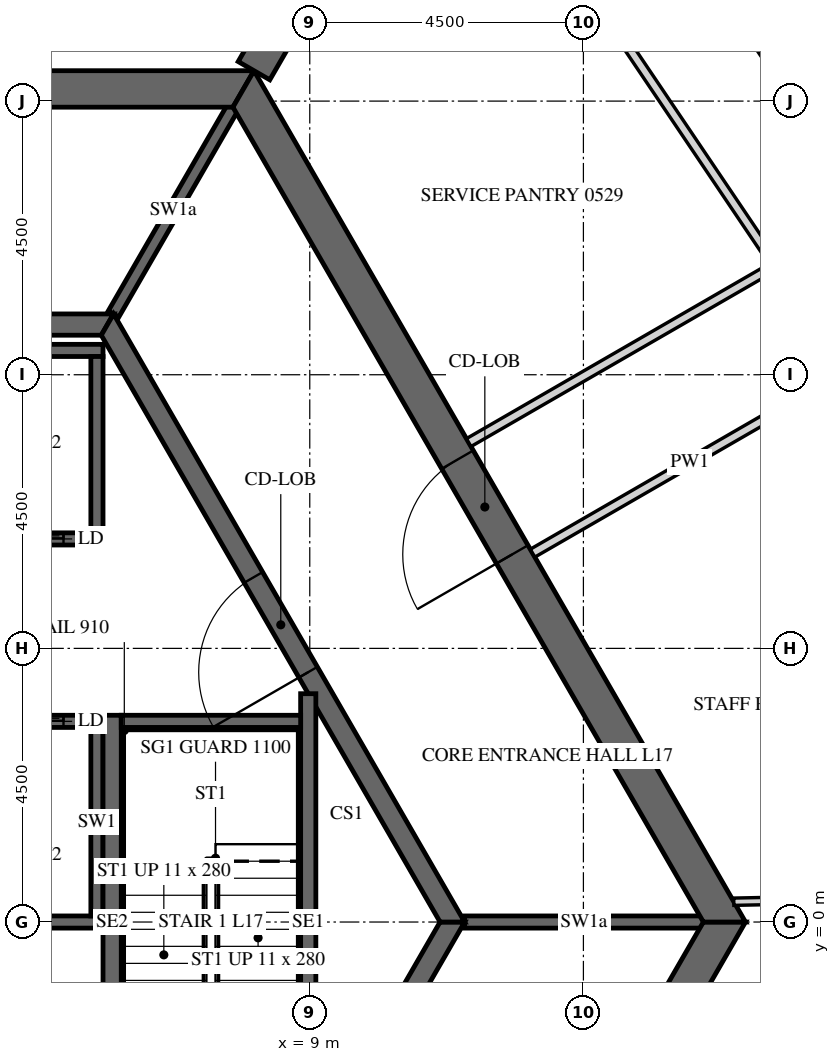
"""IFC4 building model, lengths in metres.
Left out: names, types, materials, properties, quantities, classifications, styles, units other than length and angle.
Written with IfcOpenShell. Run it as: python <this file> out.ifc"""

import sys

from ifc_helpers import new_model, si_unit, direction, frame, frame_2d, origin, place, context, subcontext, project, spatial, polyline, rectangle, outline, extrude, element, fill, save


model = new_model("IFC4")
c1 = context("Model", 3, precision=1e-05, world=origin(), true_north=direction((0.0, 1.0)))
c2 = subcontext(c1, "Body", "Model", "MODEL_VIEW")
j1 = project(units=[si_unit("LENGTHUNIT", "METRE"), si_unit("PLANEANGLEUNIT", "RADIAN")], contexts=[c1])
p1 = place(None, origin())
s1 = spatial("IfcSite", under=j1, at=p1, CompositionType="ELEMENT")
p2 = place(p1, origin())
s2 = spatial("IfcBuilding", under=s1, at=p2, CompositionType="ELEMENT")
p3 = place(p2, frame((0.0, 0.0, 80.4)))
s3 = spatial("IfcBuildingStorey", under=s2, at=p3, CompositionType="ELEMENT", Elevation=80.4)
p4 = place(p3, frame((7.91, -13.7, -0.15), z_axis=(0.0, 0.0, 1.0), x_axis=(0.499999880136, 0.866025472988, 0.0)))
e1 = element("IfcWall", 1, at=p4, inside=s3, PredefinedType="SHEAR", context=c2, shape_type="SweptSolid", body=[
    extrude(outline(polyline([(-0.173, -0.3), (15.993, -0.3), (15.646, 0.3), (0.173, 0.3), (-0.173, -0.3)])), origin(), (0.0, 0.0, 1.0), 3.9),
])
p5 = place(p4, frame((7.039, 0.0, 0.15)))
e2 = element("IfcOpeningElement", 2, at=p5, cuts=e1, PredefinedType="OPENING", context=c2, shape_type="SweptSolid", body=[
    extrude(rectangle(XDim=1.8, YDim=2.4, at=frame_2d((0.9, 1.2))), frame((0.0, 0.31, 0.0), z_axis=(0.0, -1.0, 0.0), x_axis=(1.0, 0.0, 0.0)), (0.0, 0.0, 1.0), 0.62),
])
p6 = place(p3, frame((15.819, 0.0, -0.15), z_axis=(0.0, 0.0, 1.0), x_axis=(-0.499999880136, 0.866025472988, 0.0)))
e3 = element("IfcWall", 3, at=p6, inside=s3, PredefinedType="SHEAR", context=c2, shape_type="SweptSolid", body=[
    extrude(outline(polyline([(-0.173, -0.3), (15.993, -0.3), (15.646, 0.3), (0.173, 0.3), (-0.173, -0.3)])), origin(), (0.0, 0.0, 1.0), 3.9),
])
p7 = place(p6, frame((6.981, 0.0, 0.15)))
e4 = element("IfcOpeningElement", 4, at=p7, cuts=e3, PredefinedType="OPENING", context=c2, shape_type="SweptSolid", body=[
    extrude(rectangle(XDim=1.8, YDim=2.4, at=frame_2d((0.9, 1.2))), frame((0.0, 0.31, 0.0), z_axis=(0.0, -1.0, 0.0), x_axis=(1.0, 0.0, 0.0)), (0.0, 0.0, 1.0), 0.62),
])
p8 = place(p3, frame((7.91, 13.7, -0.15), z_axis=(0.0, 0.0, 1.0), x_axis=(-1.0, 0.0, 0.0)))
e5 = element("IfcWall", 5, at=p8, inside=s3, PredefinedType="SHEAR", context=c2, shape_type="SweptSolid", body=[
    extrude(outline(polyline([(-0.173, -0.3), (15.993, -0.3), (15.646, 0.3), (0.173, 0.3), (-0.173, -0.3)])), origin(), (0.0, 0.0, 1.0), 3.9),
])
p9 = place(p8, frame((7.31, 0.0, 0.15)))
e6 = element("IfcOpeningElement", 6, at=p9, cuts=e5, PredefinedType="OPENING", context=c2, shape_type="SweptSolid", body=[
    extrude(rectangle(XDim=1.2, YDim=2.4, at=frame_2d((0.6, 1.2))), frame((0.0, 0.31, 0.0), z_axis=(0.0, -1.0, 0.0), x_axis=(1.0, 0.0, 0.0)), (0.0, 0.0, 1.0), 0.62),
])
p10 = place(p3, frame((8.083, 14.0, -0.15), z_axis=(0.0, 0.0, 1.0), x_axis=(0.499997680643, 0.866026742862, 0.0)))
e7 = element("IfcWall", 7, at=p10, inside=s3, PredefinedType="SHEAR", context=c2, shape_type="SweptSolid", body=[
    extrude(rectangle(XDim=16.509, YDim=0.6, at=frame_2d((8.254, 0.0))), origin(), (0.0, 0.0, 1.0), 3.9),
])
p11 = place(p10, frame((7.354, 0.0, 0.15)))
e8 = element("IfcOpeningElement", 8, at=p11, cuts=e7, PredefinedType="OPENING", context=c2, shape_type="SweptSolid", body=[
    extrude(rectangle(XDim=1.8, YDim=2.4, at=frame_2d((0.9, 1.2))), frame((0.0, 0.31, 0.0), z_axis=(0.0, -1.0, 0.0), x_axis=(1.0, 0.0, 0.0)), (0.0, 0.0, 1.0), 0.62),
])
p12 = place(p3, frame((5.673, -9.825, -0.15), z_axis=(0.0, 0.0, 1.0), x_axis=(0.499995046907, 0.866028263435, 0.0)))
e9 = element("IfcWall", 9, at=p12, inside=s3, PredefinedType="SHEAR", context=c2, shape_type="SweptSolid", body=[
    extrude(outline(polyline([(-0.101, -0.175), (11.446, -0.175), (11.244, 0.175), (0.101, 0.175), (-0.101, -0.175)])), origin(), (0.0, 0.0, 1.0), 3.9),
])
p13 = place(p12, frame((4.801, 0.0, 0.15)))
e10 = element("IfcOpeningElement", 10, at=p13, cuts=e9, PredefinedType="OPENING", context=c2, shape_type="SweptSolid", body=[
    extrude(rectangle(XDim=1.8, YDim=2.4, at=frame_2d((0.9, 1.2))), frame((0.0, 0.185, 0.0), z_axis=(0.0, -1.0, 0.0), x_axis=(1.0, 0.0, 0.0)), (0.0, 0.0, 1.0), 0.37),
])
p14 = place(p3, frame((11.345, 0.0, -0.15), z_axis=(0.0, 0.0, 1.0), x_axis=(-0.499995046907, 0.866028263435, 0.0)))
e11 = element("IfcWall", 11, at=p14, inside=s3, PredefinedType="SHEAR", context=c2, shape_type="SweptSolid", body=[
    extrude(outline(polyline([(-0.101, -0.175), (11.446, -0.175), (11.244, 0.175), (0.101, 0.175), (-0.101, -0.175)])), origin(), (0.0, 0.0, 1.0), 3.9),
])
p15 = place(p14, frame((4.744, 0.0, 0.15)))
e12 = element("IfcOpeningElement", 12, at=p15, cuts=e11, PredefinedType="OPENING", context=c2, shape_type="SweptSolid", body=[
    extrude(rectangle(XDim=1.8, YDim=2.4, at=frame_2d((0.9, 1.2))), frame((0.0, 0.185, 0.0), z_axis=(0.0, -1.0, 0.0), x_axis=(1.0, 0.0, 0.0)), (0.0, 0.0, 1.0), 0.37),
])
p16 = place(p3, frame((5.673, 9.825, -0.15), z_axis=(0.0, 0.0, 1.0), x_axis=(-1.0, 0.0, 0.0)))
e13 = element("IfcWall", 13, at=p16, inside=s3, PredefinedType="SHEAR", context=c2, shape_type="SweptSolid", body=[
    extrude(outline(polyline([(-0.101, -0.175), (11.446, -0.175), (11.244, 0.175), (0.101, 0.175), (-0.101, -0.175)])), origin(), (0.0, 0.0, 1.0), 3.9),
])
p17 = place(p3, frame((-5.6, 6.3, -0.25), z_axis=(0.0, 0.0, 1.0), x_axis=(1.0, 0.0, 0.0)))
e14 = element("IfcWall", 14, at=p17, inside=s3, PredefinedType="SHEAR", context=c2, shape_type="SweptSolid", body=[
    extrude(rectangle(XDim=11.2, YDim=0.2, at=frame_2d((5.6, 0.0))), origin(), (0.0, 0.0, 1.0), 3.9),
])
p18 = place(p17, frame((0.65, 0.0, 0.25)))
e15 = element("IfcOpeningElement", 15, at=p18, cuts=e14, PredefinedType="OPENING", context=c2, shape_type="SweptSolid", body=[
    extrude(rectangle(XDim=1.1, YDim=2.1, at=frame_2d((0.55, 1.05))), frame((0.0, 0.11, 0.0), z_axis=(0.0, -1.0, 0.0), x_axis=(1.0, 0.0, 0.0)), (0.0, 0.0, 1.0), 0.22),
])
p19 = place(p17, frame((2.85, 0.0, 0.25)))
e16 = element("IfcOpeningElement", 16, at=p19, cuts=e14, PredefinedType="OPENING", context=c2, shape_type="SweptSolid", body=[
    extrude(rectangle(XDim=1.1, YDim=2.1, at=frame_2d((0.55, 1.05))), frame((0.0, 0.11, 0.0), z_axis=(0.0, -1.0, 0.0), x_axis=(1.0, 0.0, 0.0)), (0.0, 0.0, 1.0), 0.22),
])
p20 = place(p17, frame((5.05, 0.0, 0.25)))
e17 = element("IfcOpeningElement", 17, at=p20, cuts=e14, PredefinedType="OPENING", context=c2, shape_type="SweptSolid", body=[
    extrude(rectangle(XDim=1.1, YDim=2.1, at=frame_2d((0.55, 1.05))), frame((0.0, 0.11, 0.0), z_axis=(0.0, -1.0, 0.0), x_axis=(1.0, 0.0, 0.0)), (0.0, 0.0, 1.0), 0.22),
])
p21 = place(p17, frame((7.25, 0.0, 0.25)))
e18 = element("IfcOpeningElement", 18, at=p21, cuts=e14, PredefinedType="OPENING", context=c2, shape_type="SweptSolid", body=[
    extrude(rectangle(XDim=1.1, YDim=2.1, at=frame_2d((0.55, 1.05))), frame((0.0, 0.11, 0.0), z_axis=(0.0, -1.0, 0.0), x_axis=(1.0, 0.0, 0.0)), (0.0, 0.0, 1.0), 0.22),
])
p22 = place(p17, frame((9.45, 0.0, 0.25)))
e19 = element("IfcOpeningElement", 19, at=p22, cuts=e14, PredefinedType="OPENING", context=c2, shape_type="SweptSolid", body=[
    extrude(rectangle(XDim=1.1, YDim=2.1, at=frame_2d((0.55, 1.05))), frame((0.0, 0.11, 0.0), z_axis=(0.0, -1.0, 0.0), x_axis=(1.0, 0.0, 0.0)), (0.0, 0.0, 1.0), 0.22),
])
p23 = place(p3, frame((-5.6, 9.4, -0.25), z_axis=(0.0, 0.0, 1.0), x_axis=(1.0, 0.0, 0.0)))
e20 = element("IfcWall", 20, at=p23, inside=s3, PredefinedType="SHEAR", context=c2, shape_type="SweptSolid", body=[
    extrude(rectangle(XDim=11.2, YDim=0.2, at=frame_2d((5.6, 0.0))), origin(), (0.0, 0.0, 1.0), 3.9),
])
p24 = place(p3, frame((5.5, 6.4, -0.25), z_axis=(0.0, 0.0, 1.0), x_axis=(0.0, 1.0, 0.0)))
e21 = element("IfcWall", 21, at=p24, inside=s3, PredefinedType="SHEAR", context=c2, shape_type="SweptSolid", body=[
    extrude(rectangle(XDim=2.9, YDim=0.2, at=frame_2d((1.45, 0.0))), origin(), (0.0, 0.0, 1.0), 3.9),
])
p25 = place(p3, frame((-5.6, 3.3, -0.25), z_axis=(0.0, 0.0, 1.0), x_axis=(1.0, 0.0, 0.0)))
e22 = element("IfcWall", 22, at=p25, inside=s3, PredefinedType="SHEAR", context=c2, shape_type="SweptSolid", body=[
    extrude(rectangle(XDim=11.2, YDim=0.2, at=frame_2d((5.6, 0.0))), origin(), (0.0, 0.0, 1.0), 3.9),
])
p26 = place(p25, frame((0.65, 0.0, 0.25)))
e23 = element("IfcOpeningElement", 23, at=p26, cuts=e22, PredefinedType="OPENING", context=c2, shape_type="SweptSolid", body=[
    extrude(rectangle(XDim=1.1, YDim=2.1, at=frame_2d((0.55, 1.05))), frame((0.0, 0.11, 0.0), z_axis=(0.0, -1.0, 0.0), x_axis=(1.0, 0.0, 0.0)), (0.0, 0.0, 1.0), 0.22),
])
p27 = place(p25, frame((2.85, 0.0, 0.25)))
e24 = element("IfcOpeningElement", 24, at=p27, cuts=e22, PredefinedType="OPENING", context=c2, shape_type="SweptSolid", body=[
    extrude(rectangle(XDim=1.1, YDim=2.1, at=frame_2d((0.55, 1.05))), frame((0.0, 0.11, 0.0), z_axis=(0.0, -1.0, 0.0), x_axis=(1.0, 0.0, 0.0)), (0.0, 0.0, 1.0), 0.22),
])
p28 = place(p25, frame((5.05, 0.0, 0.25)))
e25 = element("IfcOpeningElement", 25, at=p28, cuts=e22, PredefinedType="OPENING", context=c2, shape_type="SweptSolid", body=[
    extrude(rectangle(XDim=1.1, YDim=2.1, at=frame_2d((0.55, 1.05))), frame((0.0, 0.11, 0.0), z_axis=(0.0, -1.0, 0.0), x_axis=(1.0, 0.0, 0.0)), (0.0, 0.0, 1.0), 0.22),
])
p29 = place(p25, frame((7.25, 0.0, 0.25)))
e26 = element("IfcOpeningElement", 26, at=p29, cuts=e22, PredefinedType="OPENING", context=c2, shape_type="SweptSolid", body=[
    extrude(rectangle(XDim=1.1, YDim=2.1, at=frame_2d((0.55, 1.05))), frame((0.0, 0.11, 0.0), z_axis=(0.0, -1.0, 0.0), x_axis=(1.0, 0.0, 0.0)), (0.0, 0.0, 1.0), 0.22),
])
p30 = place(p25, frame((9.45, 0.0, 0.25)))
e27 = element("IfcOpeningElement", 27, at=p30, cuts=e22, PredefinedType="OPENING", context=c2, shape_type="SweptSolid", body=[
    extrude(rectangle(XDim=1.1, YDim=2.1, at=frame_2d((0.55, 1.05))), frame((0.0, 0.11, 0.0), z_axis=(0.0, -1.0, 0.0), x_axis=(1.0, 0.0, 0.0)), (0.0, 0.0, 1.0), 0.22),
])
p31 = place(p3, frame((-5.6, 0.0, -0.25), z_axis=(0.0, 0.0, 1.0), x_axis=(1.0, 0.0, 0.0)))
e28 = element("IfcWall", 28, at=p31, inside=s3, PredefinedType="SHEAR", context=c2, shape_type="SweptSolid", body=[
    extrude(rectangle(XDim=11.2, YDim=0.2, at=frame_2d((5.6, 0.0))), origin(), (0.0, 0.0, 1.0), 3.9),
])
p32 = place(p3, frame((5.5, 0.1, -0.25), z_axis=(0.0, 0.0, 1.0), x_axis=(0.0, 1.0, 0.0)))
e29 = element("IfcWall", 29, at=p32, inside=s3, PredefinedType="SHEAR", context=c2, shape_type="SweptSolid", body=[
    extrude(rectangle(XDim=3.1, YDim=0.2, at=frame_2d((1.55, 0.0))), origin(), (0.0, 0.0, 1.0), 3.9),
])
p33 = place(p3, frame((11.547, 0.0, -0.15), z_axis=(0.0, 0.0, 1.0), x_axis=(1.0, 0.0, 0.0)))
e30 = element("IfcWall", 30, at=p33, inside=s3, PredefinedType="SHEAR", context=c2, shape_type="SweptSolid", body=[
    extrude(rectangle(XDim=3.926, YDim=0.2, at=frame_2d((1.963, 0.0))), origin(), (0.0, 0.0, 1.0), 3.9),
])
p34 = place(p3, frame((5.773, 10.0, -0.15), z_axis=(0.0, 0.0, 1.0), x_axis=(0.500038251005, 0.86600331843, 0.0)))
e31 = element("IfcWall", 31, at=p34, inside=s3, PredefinedType="SHEAR", context=c2, shape_type="SweptSolid", body=[
    extrude(rectangle(XDim=3.926, YDim=0.2, at=frame_2d((1.963, 0.0))), origin(), (0.0, 0.0, 1.0), 3.9),
])
p35 = place(p3, frame((5.75, -3.4, -0.25), z_axis=(0.0, 0.0, 1.0), x_axis=(0.0, 1.0, 0.0)))
e32 = element("IfcWall", 32, at=p35, inside=s3, PredefinedType="SHEAR", context=c2, shape_type="SweptSolid", body=[
    extrude(rectangle(XDim=6.8, YDim=0.3, at=frame_2d((3.4, 0.0))), origin(), (0.0, 0.0, 1.0), 3.9),
])
p36 = place(p3, frame((8.975, -3.755, -0.25), z_axis=(0.0, 0.0, 1.0), x_axis=(0.0, 1.0, 0.0)))
e33 = element("IfcWall", 33, at=p36, inside=s3, PredefinedType="SHEAR", context=c2, shape_type="SweptSolid", body=[
    extrude(rectangle(XDim=7.51, YDim=0.25, at=frame_2d((3.755, 0.0))), origin(), (0.0, 0.0, 1.0), 3.9),
])
p37 = place(p3, frame((5.9, 3.3, -0.25), z_axis=(0.0, 0.0, 1.0), x_axis=(1.0, 0.0, 0.0)))
e34 = element("IfcWall", 34, at=p37, inside=s3, PredefinedType="SHEAR", context=c2, shape_type="SweptSolid", body=[
    extrude(rectangle(XDim=2.95, YDim=0.2, at=frame_2d((1.475, 0.0))), origin(), (0.0, 0.0, 1.0), 3.9),
])
p38 = place(p3, frame((13.755, -19.475, 0.0), z_axis=(0.0, 0.0, 1.0), x_axis=(0.50000013933, 0.866025323342, 0.0)))
e35 = element("IfcWall", 35, at=p38, inside=s3, PredefinedType="PARTITIONING", context=c2, shape_type="SweptSolid", body=[
    extrude(rectangle(XDim=23.517, YDim=0.15, at=frame_2d((11.758, 0.0))), origin(), (0.0, 0.0, 1.0), 2.988),
])
p39 = place(p38, frame((2.056, 0.0, 0.0)))
e36 = element("IfcOpeningElement", 36, at=p39, cuts=e35, PredefinedType="OPENING", context=c2, shape_type="SweptSolid", body=[
    extrude(rectangle(XDim=1.0, YDim=2.1, at=frame_2d((0.5, 1.05))), frame((0.0, 0.085, 0.0), z_axis=(0.0, -1.0, 0.0), x_axis=(1.0, 0.0, 0.0)), (0.0, 0.0, 1.0), 0.17),
])
p40 = place(p38, frame((15.499, 0.0, 0.0)))
e37 = element("IfcOpeningElement", 37, at=p40, cuts=e35, PredefinedType="OPENING", context=c2, shape_type="SweptSolid", body=[
    extrude(rectangle(XDim=1.0, YDim=2.1, at=frame_2d((0.5, 1.05))), frame((0.0, 0.085, 0.0), z_axis=(0.0, -1.0, 0.0), x_axis=(1.0, 0.0, 0.0)), (0.0, 0.0, 1.0), 0.17),
])
p41 = place(p3, frame((25.467, 0.96, 0.0), z_axis=(0.0, 0.0, 1.0), x_axis=(-0.559192112521, 0.829038106057, 0.0)))
e38 = element("IfcWall", 38, at=p41, inside=s3, PredefinedType="PARTITIONING", context=c2, shape_type="SweptSolid", body=[
    extrude(rectangle(XDim=21.584, YDim=0.15, at=frame_2d((10.792, 0.0))), origin(), (0.0, 0.0, 1.0), 2.988),
])
p42 = place(p41, frame((0.184, 0.0, 0.0)))
e39 = element("IfcOpeningElement", 39, at=p42, cuts=e38, PredefinedType="OPENING", context=c2, shape_type="SweptSolid", body=[
    extrude(rectangle(XDim=1.0, YDim=2.1, at=frame_2d((0.5, 1.05))), frame((0.0, 0.085, 0.0), z_axis=(0.0, -1.0, 0.0), x_axis=(1.0, 0.0, 0.0)), (0.0, 0.0, 1.0), 0.17),
])
p43 = place(p41, frame((9.434, 0.0, 0.0)))
e40 = element("IfcOpeningElement", 40, at=p43, cuts=e38, PredefinedType="OPENING", context=c2, shape_type="SweptSolid", body=[
    extrude(rectangle(XDim=1.0, YDim=2.1, at=frame_2d((0.5, 1.05))), frame((0.0, 0.085, 0.0), z_axis=(0.0, -1.0, 0.0), x_axis=(1.0, 0.0, 0.0)), (0.0, 0.0, 1.0), 0.17),
])
p44 = place(p41, frame((16.951, 0.0, 0.0)))
e41 = element("IfcOpeningElement", 41, at=p44, cuts=e38, PredefinedType="OPENING", context=c2, shape_type="SweptSolid", body=[
    extrude(rectangle(XDim=1.0, YDim=2.1, at=frame_2d((0.5, 1.05))), frame((0.0, 0.085, 0.0), z_axis=(0.0, -1.0, 0.0), x_axis=(1.0, 0.0, 0.0)), (0.0, 0.0, 1.0), 0.17),
])
p45 = place(p3, frame((12.664, 6.066, 0.0), z_axis=(0.0, 0.0, 1.0), x_axis=(0.866018848283, 0.500011354289, 0.0)))
e42 = element("IfcWall", 42, at=p45, inside=s3, PredefinedType="PARTITIONING", context=c2, shape_type="SweptSolid", body=[
    extrude(rectangle(XDim=5.974, YDim=0.15, at=frame_2d((2.987, 0.0))), origin(), (0.0, 0.0, 1.0), 2.988),
])
p46 = place(p3, frame((11.298, 18.748, 0.0), z_axis=(0.0, 0.0, 1.0), x_axis=(0.559198234291, -0.829033976847, 0.0)))
e43 = element("IfcWall", 43, at=p46, inside=s3, PredefinedType="PARTITIONING", context=c2, shape_type="SweptSolid", body=[
    extrude(rectangle(XDim=9.59, YDim=0.15, at=frame_2d((4.795, 0.0))), origin(), (0.0, 0.0, 1.0), 2.988),
])
p47 = place(p46, frame((4.345, 0.0, 0.0)))
e44 = element("IfcOpeningElement", 44, at=p47, cuts=e43, PredefinedType="OPENING", context=c2, shape_type="SweptSolid", body=[
    extrude(rectangle(XDim=0.9, YDim=2.1, at=frame_2d((0.45, 1.05))), frame((0.0, 0.085, 0.0), z_axis=(0.0, -1.0, 0.0), x_axis=(1.0, 0.0, 0.0)), (0.0, 0.0, 1.0), 0.17),
])
p48 = place(p3, frame((16.595, 10.76, 0.0), z_axis=(0.0, 0.0, 1.0), x_axis=(-0.866019477104, -0.500010265171, 0.0)))
e45 = element("IfcWall", 45, at=p48, inside=s3, PredefinedType="PARTITIONING", context=c2, shape_type="SweptSolid", body=[
    extrude(rectangle(XDim=5.752, YDim=0.15, at=frame_2d((2.876, 0.0))), origin(), (0.0, 0.0, 1.0), 2.988),
])
p49 = place(p3, frame((23.113, 0.483, 0.0), z_axis=(0.0, 0.0, 1.0), x_axis=(-0.999781109464, -0.020922073482, 0.0)))
e46 = element("IfcWall", 46, at=p49, inside=s3, PredefinedType="PARTITIONING", context=c2, shape_type="SweptSolid", body=[
    extrude(rectangle(XDim=7.141, YDim=0.12, at=frame_2d((3.571, 0.0))), origin(), (0.0, 0.0, 1.0), 2.988),
])
p50 = place(p7, origin())
e47 = element("IfcDoor", 47, at=p50, inside=s3, OperationType="DOUBLE_DOOR_SINGLE_SWING", PredefinedType="DOOR", context=c2, shape_type="SweptSolid", body=[
    extrude(rectangle(XDim=1.8, YDim=2.4, at=frame_2d((0.9, 1.2))), frame((0.0, 0.025, 0.0), z_axis=(0.0, -1.0, 0.0), x_axis=(1.0, 0.0, 0.0)), (0.0, 0.0, 1.0), 0.05),
])
fill(e4, e47)
p51 = place(p15, origin())
e48 = element("IfcDoor", 48, at=p51, inside=s3, OperationType="DOUBLE_DOOR_SINGLE_SWING", PredefinedType="DOOR", context=c2, shape_type="SweptSolid", body=[
    extrude(rectangle(XDim=1.8, YDim=2.4, at=frame_2d((0.9, 1.2))), frame((0.0, 0.025, 0.0), z_axis=(0.0, -1.0, 0.0), x_axis=(1.0, 0.0, 0.0)), (0.0, 0.0, 1.0), 0.05),
])
fill(e12, e48)
p52 = place(p22, origin())
e49 = element("IfcDoor", 49, at=p52, inside=s3, OperationType="SLIDING_TO_LEFT", PredefinedType="DOOR", context=c2, shape_type="SweptSolid", body=[
    extrude(rectangle(XDim=1.1, YDim=2.1, at=frame_2d((0.55, 1.05))), frame((0.0, 0.025, 0.0), z_axis=(0.0, -1.0, 0.0), x_axis=(1.0, 0.0, 0.0)), (0.0, 0.0, 1.0), 0.05),
])
fill(e19, e49)
p53 = place(p30, origin())
e50 = element("IfcDoor", 50, at=p53, inside=s3, OperationType="SLIDING_TO_LEFT", PredefinedType="DOOR", context=c2, shape_type="SweptSolid", body=[
    extrude(rectangle(XDim=1.1, YDim=2.1, at=frame_2d((0.55, 1.05))), frame((0.0, 0.025, 0.0), z_axis=(0.0, -1.0, 0.0), x_axis=(1.0, 0.0, 0.0)), (0.0, 0.0, 1.0), 0.05),
])
fill(e27, e50)
save(model, sys.argv[1])
